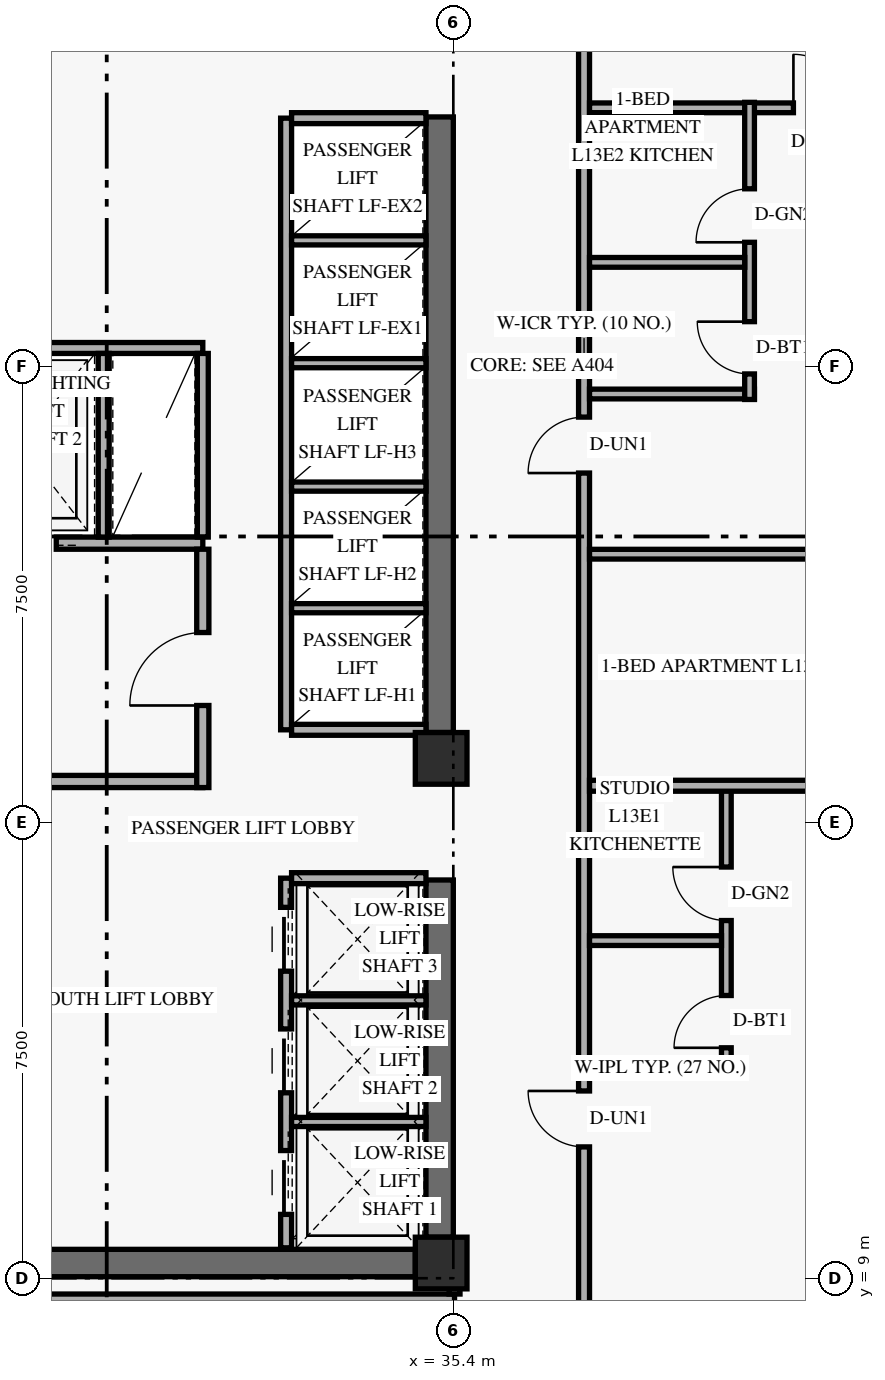
"""IFC4 building model, lengths in metres.
Left out: names, types, materials, properties, quantities, classifications, styles, units other than length and angle.
Written with IfcOpenShell. Run it as: python <this file> out.ifc"""

import sys

from ifc_helpers import new_model, si_unit, direction, frame, frame_2d, origin, origin_2d, place, context, subcontext, project, spatial, rectangle, extrude, element, fill, save


model = new_model("IFC4")
c1 = context("Model", 3, precision=1e-05, world=origin(), true_north=direction((0.0, 1.0)))
c2 = subcontext(c1, "Body", "Model", "MODEL_VIEW")
j1 = project(units=[si_unit("LENGTHUNIT", "METRE"), si_unit("PLANEANGLEUNIT", "RADIAN")], contexts=[c1])
p1 = place(None, origin())
s1 = spatial("IfcSite", under=j1, at=p1, CompositionType="ELEMENT")
p2 = place(p1, origin())
s2 = spatial("IfcBuilding", under=s1, at=p2, CompositionType="ELEMENT")
p3 = place(p2, frame((0.0, 0.0, 52.8)))
s3 = spatial("IfcBuildingStorey", under=s2, at=p3, CompositionType="ELEMENT", Elevation=52.8)
p4 = place(p3, frame((35.175, 9.675, 0.0), z_axis=(0.0, 0.0, 1.0), x_axis=(0.0, 1.0, 0.0)))
e1 = element("IfcWall", 1, at=p4, inside=s3, PredefinedType="SHEAR", context=c2, shape_type="SweptSolid", body=[
    extrude(rectangle(XDim=5.875, YDim=0.45, at=frame_2d((2.938, 0.0))), origin(), (0.0, 0.0, 1.0), 2.667),
])
p5 = place(p3, frame((35.175, 17.975, 0.0), z_axis=(0.0, 0.0, 1.0), x_axis=(0.0, 1.0, 0.0)))
e2 = element("IfcWall", 2, at=p5, inside=s3, PredefinedType="SHEAR", context=c2, shape_type="SweptSolid", body=[
    extrude(rectangle(XDim=10.125, YDim=0.45, at=frame_2d((5.062, 0.0))), origin(), (0.0, 0.0, 1.0), 2.667),
])
p6 = place(p3, frame((24.625, 9.25, 0.0), z_axis=(0.0, 0.0, 1.0), x_axis=(1.0, 0.0, 0.0)))
e3 = element("IfcWall", 3, at=p6, inside=s3, PredefinedType="SHEAR", context=c2, shape_type="SweptSolid", body=[
    extrude(rectangle(XDim=10.15, YDim=0.45, at=frame_2d((5.075, 0.0))), origin(), (0.0, 0.0, 1.0), 3.36),
])
for number, where, z_axis, x_axis in (
    (4, (35.2, 9.25, 0.0), (0.0, 0.0, 1.0), (1.0, 0.0, 0.0)),
    (5, (35.2, 17.55, 0.0), (0.0, 0.0, 1.0), (1.0, 0.0, 0.0)),
):
    element("IfcColumn", number, at=place(p3, frame(where, z_axis=z_axis, x_axis=x_axis)), inside=s3, PredefinedType="COLUMN", context=c2, shape_type="SweptSolid", body=[
        extrude(rectangle(XDim=0.85, YDim=0.85, at=origin_2d()), origin(), (0.0, 0.0, 1.0), 3.6),
    ])
p7 = place(p3, frame((24.45, 21.09, 0.0), z_axis=(0.0, 0.0, 1.0), x_axis=(1.0, 0.0, 0.0)))
e6 = element("IfcWall", 6, at=p7, inside=s3, PredefinedType="STANDARD", context=c2, shape_type="SweptSolid", body=[
    extrude(rectangle(XDim=6.83, YDim=0.2, at=frame_2d((3.415, 0.0))), origin(), (0.0, 0.0, 1.0), 3.36),
])
p8 = place(p7, frame((0.72, 0.0, 0.0)))
e7 = element("IfcOpeningElement", 7, at=p8, cuts=e6, PredefinedType="OPENING", context=c2, shape_type="SweptSolid", body=[
    extrude(rectangle(XDim=1.1, YDim=2.2, at=frame_2d((0.55, 1.1))), frame((0.0, 0.11, 0.0), z_axis=(0.0, -1.0, 0.0), x_axis=(1.0, 0.0, 0.0)), (0.0, 0.0, 1.0), 0.22),
])
p9 = place(p7, frame((3.32, 0.0, 0.0)))
e8 = element("IfcOpeningElement", 8, at=p9, cuts=e6, PredefinedType="OPENING", context=c2, shape_type="SweptSolid", body=[
    extrude(rectangle(XDim=1.1, YDim=2.2, at=frame_2d((0.55, 1.1))), frame((0.0, 0.11, 0.0), z_axis=(0.0, -1.0, 0.0), x_axis=(1.0, 0.0, 0.0)), (0.0, 0.0, 1.0), 0.22),
])
p10 = place(p3, frame((28.38, 17.17, 0.0), z_axis=(0.0, 0.0, 1.0), x_axis=(1.0, 0.0, 0.0)))
e9 = element("IfcWall", 9, at=p10, inside=s3, PredefinedType="STANDARD", context=c2, shape_type="SweptSolid", body=[
    extrude(rectangle(XDim=2.9, YDim=0.2, at=frame_2d((1.45, 0.0))), origin(), (0.0, 0.0, 1.0), 3.36),
])
p11 = place(p3, frame((31.28, 17.07, 0.0), z_axis=(0.0, 0.0, 1.0), x_axis=(0.0, 1.0, 0.0)))
e10 = element("IfcWall", 10, at=p11, inside=s3, PredefinedType="STANDARD", context=c2, shape_type="SweptSolid", body=[
    extrude(rectangle(XDim=3.92, YDim=0.2, at=frame_2d((1.96, 0.0))), origin(), (0.0, 0.0, 1.0), 2.649),
])
p12 = place(p11, frame((1.35, 0.0, 0.0)))
e11 = element("IfcOpeningElement", 11, at=p12, cuts=e10, PredefinedType="OPENING", context=c2, shape_type="SweptSolid", body=[
    extrude(rectangle(XDim=1.2, YDim=2.15, at=frame_2d((0.6, 1.075))), frame((0.0, 0.11, 0.0), z_axis=(0.0, -1.0, 0.0), x_axis=(1.0, 0.0, 0.0)), (0.0, 0.0, 1.0), 0.22),
])
p13 = place(p3, frame((24.45, 24.3, 0.0), z_axis=(0.0, 0.0, 1.0), x_axis=(1.0, 0.0, 0.0)))
e12 = element("IfcWall", 12, at=p13, inside=s3, PredefinedType="STANDARD", context=c2, shape_type="SweptSolid", body=[
    extrude(rectangle(XDim=6.83, YDim=0.18, at=frame_2d((3.415, 0.0))), origin(), (0.0, 0.0, 1.0), 3.36),
])
for number, where, z_axis, x_axis in (
    (13, (29.65, 21.19, 0.0), (0.0, 0.0, 1.0), (0.0, 1.0, 0.0)),
    (14, (31.28, 21.19, 0.0), (0.0, 0.0, 1.0), (0.0, 1.0, 0.0)),
):
    element("IfcWall", number, at=place(p3, frame(where, z_axis=z_axis, x_axis=x_axis)), inside=s3, PredefinedType="STANDARD", context=c2, shape_type="SweptSolid", body=[
        extrude(rectangle(XDim=3.02, YDim=0.18, at=frame_2d((1.51, 0.0))), origin(), (0.0, 0.0, 1.0), 3.36),
    ])
p14 = place(p3, frame((32.65, 9.5, 0.0), z_axis=(0.0, 0.0, 1.0), x_axis=(0.0, 1.0, 0.0)))
e15 = element("IfcWall", 15, at=p14, inside=s3, PredefinedType="STANDARD", context=c2, shape_type="SweptSolid", body=[
    extrude(rectangle(XDim=6.08, YDim=0.18, at=frame_2d((3.04, 0.0))), origin(), (0.0, 0.0, 1.0), 3.36),
])
p15 = place(p14, frame((0.55, 0.0, 0.0)))
e16 = element("IfcOpeningElement", 16, at=p15, cuts=e15, PredefinedType="OPENING", context=c2, shape_type="SweptSolid", body=[
    extrude(rectangle(XDim=1.05, YDim=2.2, at=frame_2d((0.525, 1.1))), frame((0.0, 0.1, 0.0), z_axis=(0.0, -1.0, 0.0), x_axis=(1.0, 0.0, 0.0)), (0.0, 0.0, 1.0), 0.2),
])
p16 = place(p14, frame((2.55, 0.0, 0.0)))
e17 = element("IfcOpeningElement", 17, at=p16, cuts=e15, PredefinedType="OPENING", context=c2, shape_type="SweptSolid", body=[
    extrude(rectangle(XDim=1.05, YDim=2.2, at=frame_2d((0.525, 1.1))), frame((0.0, 0.1, 0.0), z_axis=(0.0, -1.0, 0.0), x_axis=(1.0, 0.0, 0.0)), (0.0, 0.0, 1.0), 0.2),
])
p17 = place(p14, frame((4.55, 0.0, 0.0)))
e18 = element("IfcOpeningElement", 18, at=p17, cuts=e15, PredefinedType="OPENING", context=c2, shape_type="SweptSolid", body=[
    extrude(rectangle(XDim=1.05, YDim=2.2, at=frame_2d((0.525, 1.1))), frame((0.0, 0.1, 0.0), z_axis=(0.0, -1.0, 0.0), x_axis=(1.0, 0.0, 0.0)), (0.0, 0.0, 1.0), 0.2),
])
p18 = place(p3, frame((32.74, 15.58, 0.0), z_axis=(0.0, 0.0, 1.0), x_axis=(1.0, 0.0, 0.0)))
e19 = element("IfcWall", 19, at=p18, inside=s3, PredefinedType="STANDARD", context=c2, shape_type="SweptSolid", body=[
    extrude(rectangle(XDim=2.21, YDim=0.18, at=frame_2d((1.105, 0.0))), origin(), (0.0, 0.0, 1.0), 3.36),
])
for number, where, z_axis, x_axis in (
    (20, (32.74, 11.57, 0.0), (0.0, 0.0, 1.0), (1.0, 0.0, 0.0)),
    (21, (32.74, 13.57, 0.0), (0.0, 0.0, 1.0), (1.0, 0.0, 0.0)),
):
    element("IfcWall", number, at=place(p3, frame(where, z_axis=z_axis, x_axis=x_axis)), inside=s3, PredefinedType="STANDARD", context=c2, shape_type="SweptSolid", body=[
        extrude(rectangle(XDim=2.21, YDim=0.15, at=frame_2d((1.105, 0.0))), origin(), (0.0, 0.0, 1.0), 3.36),
    ])
p19 = place(p3, frame((32.65, 18.02, 0.0), z_axis=(0.0, 0.0, 1.0), x_axis=(0.0, 1.0, 0.0)))
e22 = element("IfcWall", 22, at=p19, inside=s3, PredefinedType="STANDARD", context=c2, shape_type="SweptSolid", body=[
    extrude(rectangle(XDim=10.06, YDim=0.18, at=frame_2d((5.03, 0.0))), origin(), (0.0, 0.0, 1.0), 3.36),
])
for number, where, z_axis, x_axis in (
    (23, (32.74, 18.02, 0.0), (0.0, 0.0, 1.0), (1.0, 0.0, 0.0)),
    (24, (32.74, 28.08, 0.0), (0.0, 0.0, 1.0), (1.0, 0.0, 0.0)),
):
    element("IfcWall", number, at=place(p3, frame(where, z_axis=z_axis, x_axis=x_axis)), inside=s3, PredefinedType="STANDARD", context=c2, shape_type="SweptSolid", body=[
        extrude(rectangle(XDim=2.21, YDim=0.18, at=frame_2d((1.105, 0.0))), origin(), (0.0, 0.0, 1.0), 3.36),
    ])
for number, where, z_axis, x_axis in (
    (25, (32.74, 20.02, 0.0), (0.0, 0.0, 1.0), (1.0, 0.0, 0.0)),
    (26, (32.74, 22.02, 0.0), (0.0, 0.0, 1.0), (1.0, 0.0, 0.0)),
    (27, (32.74, 24.05, 0.0), (0.0, 0.0, 1.0), (1.0, 0.0, 0.0)),
    (28, (32.74, 26.07, 0.0), (0.0, 0.0, 1.0), (1.0, 0.0, 0.0)),
):
    element("IfcWall", number, at=place(p3, frame(where, z_axis=z_axis, x_axis=x_axis)), inside=s3, PredefinedType="STANDARD", context=c2, shape_type="SweptSolid", body=[
        extrude(rectangle(XDim=2.21, YDim=0.15, at=frame_2d((1.105, 0.0))), origin(), (0.0, 0.0, 1.0), 3.36),
    ])
p20 = place(p3, frame((37.55, 1.29, 0.0), z_axis=(0.0, 0.0, 1.0), x_axis=(0.0, 1.0, 0.0)))
e29 = element("IfcWall", 29, at=p20, inside=s3, PredefinedType="STANDARD", context=c2, shape_type="SweptSolid", body=[
    extrude(rectangle(XDim=45.42, YDim=0.18, at=frame_2d((22.71, 0.0))), origin(), (0.0, 0.0, 1.0), 2.649),
])
p21 = place(p20, frame((9.87, 0.0, 0.0)))
e30 = element("IfcOpeningElement", 30, at=p21, cuts=e29, PredefinedType="OPENING", context=c2, shape_type="SweptSolid", body=[
    extrude(rectangle(XDim=0.92, YDim=2.15, at=frame_2d((0.46, 1.075))), frame((0.0, 0.1, 0.0), z_axis=(0.0, -1.0, 0.0), x_axis=(1.0, 0.0, 0.0)), (0.0, 0.0, 1.0), 0.2),
])
p22 = place(p20, frame((20.953, 0.0, 0.0)))
e31 = element("IfcOpeningElement", 31, at=p22, cuts=e29, PredefinedType="OPENING", context=c2, shape_type="SweptSolid", body=[
    extrude(rectangle(XDim=0.92, YDim=2.15, at=frame_2d((0.46, 1.075))), frame((0.0, 0.1, 0.0), z_axis=(0.0, -1.0, 0.0), x_axis=(1.0, 0.0, 0.0)), (0.0, 0.0, 1.0), 0.2),
])
p23 = place(p20, frame((35.534, 0.0, 0.0)))
e32 = element("IfcOpeningElement", 32, at=p23, cuts=e29, PredefinedType="OPENING", context=c2, shape_type="SweptSolid", body=[
    extrude(rectangle(XDim=0.92, YDim=2.15, at=frame_2d((0.46, 1.075))), frame((0.0, 0.1, 0.0), z_axis=(0.0, -1.0, 0.0), x_axis=(1.0, 0.0, 0.0)), (0.0, 0.0, 1.0), 0.2),
])
p24 = place(p3, frame((23.75, 8.65, 0.0), z_axis=(0.0, 0.0, 1.0), x_axis=(1.0, 0.0, 0.0)))
e33 = element("IfcWall", 33, at=p24, inside=s3, PredefinedType="STANDARD", context=c2, shape_type="SweptSolid", body=[
    extrude(rectangle(XDim=11.67, YDim=0.18, at=frame_2d((5.835, 0.0))), origin(), (0.0, 0.0, 1.0), 2.649),
])
p25 = place(p3, frame((35.42, 8.74, 0.0), z_axis=(0.0, 0.0, 1.0), x_axis=(0.0, 1.0, 0.0)))
e34 = element("IfcWall", 34, at=p25, inside=s3, PredefinedType="STANDARD", context=c2, shape_type="SweptSolid", body=[
    extrude(rectangle(XDim=0.51, YDim=0.18, at=frame_2d((0.255, 0.0))), origin(), (0.0, 0.0, 1.0), 3.36),
])
p26 = place(p3, frame((37.64, 12.46, 0.0), z_axis=(0.0, 0.0, 1.0), x_axis=(1.0, 0.0, 0.0)))
e35 = element("IfcWall", 35, at=p26, inside=s3, PredefinedType="PLUMBINGWALL", context=c2, shape_type="SweptSolid", body=[
    extrude(rectangle(XDim=2.33, YDim=0.16, at=frame_2d((1.165, 0.0))), origin(), (0.0, 0.0, 1.0), 3.36),
])
p27 = place(p3, frame((39.89, 12.37, 0.0), z_axis=(0.0, 0.0, 1.0), x_axis=(0.0, 1.0, 0.0)))
e36 = element("IfcWall", 36, at=p27, inside=s3, PredefinedType="PLUMBINGWALL", context=c2, shape_type="SweptSolid", body=[
    extrude(rectangle(XDim=4.73, YDim=0.16, at=frame_2d((2.365, 0.0))), origin(), (0.0, 0.0, 1.0), 2.932),
])
p28 = place(p27, frame((0.42, 0.0, 0.0)))
e37 = element("IfcOpeningElement", 37, at=p28, cuts=e36, PredefinedType="OPENING", context=c2, shape_type="SweptSolid", body=[
    extrude(rectangle(XDim=0.86, YDim=2.12, at=frame_2d((0.43, 1.06))), frame((0.0, 0.09, 0.0), z_axis=(0.0, -1.0, 0.0), x_axis=(1.0, 0.0, 0.0)), (0.0, 0.0, 1.0), 0.18),
])
p29 = place(p27, frame((2.513, 0.0, 0.0)))
e38 = element("IfcOpeningElement", 38, at=p29, cuts=e36, PredefinedType="OPENING", context=c2, shape_type="SweptSolid", body=[
    extrude(rectangle(XDim=0.88, YDim=2.12, at=frame_2d((0.44, 1.06))), frame((0.0, 0.09, 0.0), z_axis=(0.0, -1.0, 0.0), x_axis=(1.0, 0.0, 0.0)), (0.0, 0.0, 1.0), 0.18),
])
p30 = place(p3, frame((37.64, 14.553, 0.0), z_axis=(0.0, 0.0, 1.0), x_axis=(1.0, 0.0, 0.0)))
e39 = element("IfcWall", 39, at=p30, inside=s3, PredefinedType="PLUMBINGWALL", context=c2, shape_type="SweptSolid", body=[
    extrude(rectangle(XDim=2.17, YDim=0.16, at=frame_2d((1.085, 0.0))), origin(), (0.0, 0.0, 1.0), 3.36),
])
p31 = place(p3, frame((37.64, 17.1, 0.0), z_axis=(0.0, 0.0, 1.0), x_axis=(1.0, 0.0, 0.0)))
e40 = element("IfcWall", 40, at=p31, inside=s3, PredefinedType="PARTITIONING", context=c2, shape_type="SweptSolid", body=[
    extrude(rectangle(XDim=10.67, YDim=0.18, at=frame_2d((5.335, 0.0))), origin(), (0.0, 0.0, 1.0), 2.649),
])
p32 = place(p3, frame((37.64, 28.25, 0.0), z_axis=(0.0, 0.0, 1.0), x_axis=(1.0, 0.0, 0.0)))
e41 = element("IfcWall", 41, at=p32, inside=s3, PredefinedType="PARTITIONING", context=c2, shape_type="SweptSolid", body=[
    extrude(rectangle(XDim=10.67, YDim=0.16, at=frame_2d((5.335, 0.0))), origin(), (0.0, 0.0, 1.0), 2.649),
])
p33 = place(p32, frame((3.353, 0.0, 0.0)))
e42 = element("IfcOpeningElement", 42, at=p33, cuts=e41, PredefinedType="OPENING", context=c2, shape_type="SweptSolid", body=[
    extrude(rectangle(XDim=0.88, YDim=2.12, at=frame_2d((0.44, 1.06))), frame((0.0, 0.09, 0.0), z_axis=(0.0, -1.0, 0.0), x_axis=(1.0, 0.0, 0.0)), (0.0, 0.0, 1.0), 0.18),
])
p34 = place(p32, frame((7.432, 0.0, 0.0)))
e43 = element("IfcOpeningElement", 43, at=p34, cuts=e41, PredefinedType="OPENING", context=c2, shape_type="SweptSolid", body=[
    extrude(rectangle(XDim=0.9, YDim=2.14, at=frame_2d((0.45, 1.07))), frame((0.0, 0.09, 0.0), z_axis=(0.0, -1.0, 0.0), x_axis=(1.0, 0.0, 0.0)), (0.0, 0.0, 1.0), 0.18),
])
p35 = place(p3, frame((37.64, 23.543, 0.0), z_axis=(0.0, 0.0, 1.0), x_axis=(1.0, 0.0, 0.0)))
e44 = element("IfcWall", 44, at=p35, inside=s3, PredefinedType="PLUMBINGWALL", context=c2, shape_type="SweptSolid", body=[
    extrude(rectangle(XDim=2.712, YDim=0.16, at=frame_2d((1.356, 0.0))), origin(), (0.0, 0.0, 1.0), 3.36),
])
p36 = place(p3, frame((40.272, 23.453, 0.0), z_axis=(0.0, 0.0, 1.0), x_axis=(0.0, 1.0, 0.0)))
e45 = element("IfcWall", 45, at=p36, inside=s3, PredefinedType="PLUMBINGWALL", context=c2, shape_type="SweptSolid", body=[
    extrude(rectangle(XDim=4.887, YDim=0.16, at=frame_2d((2.444, 0.0))), origin(), (0.0, 0.0, 1.0), 3.36),
])
p37 = place(p36, frame((0.42, 0.0, 0.0)))
e46 = element("IfcOpeningElement", 46, at=p37, cuts=e45, PredefinedType="OPENING", context=c2, shape_type="SweptSolid", body=[
    extrude(rectangle(XDim=0.86, YDim=2.12, at=frame_2d((0.43, 1.06))), frame((0.0, 0.09, 0.0), z_axis=(0.0, -1.0, 0.0), x_axis=(1.0, 0.0, 0.0)), (0.0, 0.0, 1.0), 0.18),
])
p38 = place(p36, frame((2.585, 0.0, 0.0)))
e47 = element("IfcOpeningElement", 47, at=p38, cuts=e45, PredefinedType="OPENING", context=c2, shape_type="SweptSolid", body=[
    extrude(rectangle(XDim=0.88, YDim=2.12, at=frame_2d((0.44, 1.06))), frame((0.0, 0.09, 0.0), z_axis=(0.0, -1.0, 0.0), x_axis=(1.0, 0.0, 0.0)), (0.0, 0.0, 1.0), 0.18),
])
p39 = place(p3, frame((37.64, 25.708, 0.0), z_axis=(0.0, 0.0, 1.0), x_axis=(1.0, 0.0, 0.0)))
e48 = element("IfcWall", 48, at=p39, inside=s3, PredefinedType="PLUMBINGWALL", context=c2, shape_type="SweptSolid", body=[
    extrude(rectangle(XDim=2.552, YDim=0.16, at=frame_2d((1.276, 0.0))), origin(), (0.0, 0.0, 1.0), 3.36),
])
p40 = place(p3, frame((37.64, 20.908, 0.0), z_axis=(0.0, 0.0, 1.0), x_axis=(1.0, 0.0, 0.0)))
e49 = element("IfcWall", 49, at=p40, inside=s3, PredefinedType="PARTITIONING", context=c2, shape_type="SweptSolid", body=[
    extrude(rectangle(XDim=10.67, YDim=0.16, at=frame_2d((5.335, 0.0))), origin(), (0.0, 0.0, 1.0), 2.649),
])
p41 = place(p40, frame((5.315, 0.0, 0.0)))
e50 = element("IfcOpeningElement", 50, at=p41, cuts=e49, PredefinedType="OPENING", context=c2, shape_type="SweptSolid", body=[
    extrude(rectangle(XDim=0.95, YDim=2.15, at=frame_2d((0.475, 1.075))), frame((0.0, 0.09, 0.0), z_axis=(0.0, -1.0, 0.0), x_axis=(1.0, 0.0, 0.0)), (0.0, 0.0, 1.0), 0.18),
])
p42 = place(p9, origin())
e51 = element("IfcDoor", 51, at=p42, inside=s3, OperationType="SLIDING_TO_LEFT", PredefinedType="DOOR", context=c2, shape_type="SweptSolid", body=[
    extrude(rectangle(XDim=1.1, YDim=2.2, at=frame_2d((0.55, 1.1))), frame((0.0, 0.025, 0.0), z_axis=(0.0, -1.0, 0.0), x_axis=(1.0, 0.0, 0.0)), (0.0, 0.0, 1.0), 0.05),
])
fill(e8, e51)
p43 = place(p12, origin())
e52 = element("IfcDoor", 52, at=p43, inside=s3, OperationType="SINGLE_SWING_LEFT", PredefinedType="DOOR", context=c2, shape_type="SweptSolid", body=[
    extrude(rectangle(XDim=1.2, YDim=2.15, at=frame_2d((0.6, 1.075))), frame((0.0, 0.025, 0.0), z_axis=(0.0, -1.0, 0.0), x_axis=(1.0, 0.0, 0.0)), (0.0, 0.0, 1.0), 0.05),
])
fill(e11, e52)
p44 = place(p15, origin())
e53 = element("IfcDoor", 53, at=p44, inside=s3, OperationType="SLIDING_TO_LEFT", PredefinedType="DOOR", context=c2, shape_type="SweptSolid", body=[
    extrude(rectangle(XDim=1.05, YDim=2.2, at=frame_2d((0.525, 1.1))), frame((0.0, 0.025, 0.0), z_axis=(0.0, -1.0, 0.0), x_axis=(1.0, 0.0, 0.0)), (0.0, 0.0, 1.0), 0.05),
])
fill(e16, e53)
p45 = place(p16, origin())
e54 = element("IfcDoor", 54, at=p45, inside=s3, OperationType="SLIDING_TO_LEFT", PredefinedType="DOOR", context=c2, shape_type="SweptSolid", body=[
    extrude(rectangle(XDim=1.05, YDim=2.2, at=frame_2d((0.525, 1.1))), frame((0.0, 0.025, 0.0), z_axis=(0.0, -1.0, 0.0), x_axis=(1.0, 0.0, 0.0)), (0.0, 0.0, 1.0), 0.05),
])
fill(e17, e54)
p46 = place(p17, origin())
e55 = element("IfcDoor", 55, at=p46, inside=s3, OperationType="SLIDING_TO_LEFT", PredefinedType="DOOR", context=c2, shape_type="SweptSolid", body=[
    extrude(rectangle(XDim=1.05, YDim=2.2, at=frame_2d((0.525, 1.1))), frame((0.0, 0.025, 0.0), z_axis=(0.0, -1.0, 0.0), x_axis=(1.0, 0.0, 0.0)), (0.0, 0.0, 1.0), 0.05),
])
fill(e18, e55)
p47 = place(p21, origin())
e56 = element("IfcDoor", 56, at=p47, inside=s3, OperationType="SINGLE_SWING_RIGHT", PredefinedType="DOOR", context=c2, shape_type="SweptSolid", body=[
    extrude(rectangle(XDim=0.92, YDim=2.15, at=frame_2d((0.46, 1.075))), frame((0.0, 0.025, 0.0), z_axis=(0.0, -1.0, 0.0), x_axis=(1.0, 0.0, 0.0)), (0.0, 0.0, 1.0), 0.05),
])
fill(e30, e56)
p48 = place(p28, origin())
e57 = element("IfcDoor", 57, at=p48, inside=s3, OperationType="SINGLE_SWING_LEFT", PredefinedType="DOOR", context=c2, shape_type="SweptSolid", body=[
    extrude(rectangle(XDim=0.86, YDim=2.12, at=frame_2d((0.43, 1.06))), frame((0.0, 0.025, 0.0), z_axis=(0.0, -1.0, 0.0), x_axis=(1.0, 0.0, 0.0)), (0.0, 0.0, 1.0), 0.05),
])
fill(e37, e57)
p49 = place(p29, origin())
e58 = element("IfcDoor", 58, at=p49, inside=s3, OperationType="SINGLE_SWING_RIGHT", PredefinedType="DOOR", context=c2, shape_type="SweptSolid", body=[
    extrude(rectangle(XDim=0.88, YDim=2.12, at=frame_2d((0.44, 1.06))), frame((0.0, 0.025, 0.0), z_axis=(0.0, -1.0, 0.0), x_axis=(1.0, 0.0, 0.0)), (0.0, 0.0, 1.0), 0.05),
])
fill(e38, e58)
p50 = place(p22, origin())
e59 = element("IfcDoor", 59, at=p50, inside=s3, OperationType="SINGLE_SWING_LEFT", PredefinedType="DOOR", context=c2, shape_type="SweptSolid", body=[
    extrude(rectangle(XDim=0.92, YDim=2.15, at=frame_2d((0.46, 1.075))), frame((0.0, 0.025, 0.0), z_axis=(0.0, -1.0, 0.0), x_axis=(1.0, 0.0, 0.0)), (0.0, 0.0, 1.0), 0.05),
])
fill(e31, e59)
p51 = place(p37, origin())
e60 = element("IfcDoor", 60, at=p51, inside=s3, OperationType="SINGLE_SWING_RIGHT", PredefinedType="DOOR", context=c2, shape_type="SweptSolid", body=[
    extrude(rectangle(XDim=0.86, YDim=2.12, at=frame_2d((0.43, 1.06))), frame((0.0, 0.025, 0.0), z_axis=(0.0, -1.0, 0.0), x_axis=(1.0, 0.0, 0.0)), (0.0, 0.0, 1.0), 0.05),
])
fill(e46, e60)
p52 = place(p38, origin())
e61 = element("IfcDoor", 61, at=p52, inside=s3, OperationType="SINGLE_SWING_LEFT", PredefinedType="DOOR", context=c2, shape_type="SweptSolid", body=[
    extrude(rectangle(XDim=0.88, YDim=2.12, at=frame_2d((0.44, 1.06))), frame((0.0, 0.025, 0.0), z_axis=(0.0, -1.0, 0.0), x_axis=(1.0, 0.0, 0.0)), (0.0, 0.0, 1.0), 0.05),
])
fill(e47, e61)
p53 = place(p33, origin())
e62 = element("IfcDoor", 62, at=p53, inside=s3, OperationType="SINGLE_SWING_LEFT", PredefinedType="DOOR", context=c2, shape_type="SweptSolid", body=[
    extrude(rectangle(XDim=0.88, YDim=2.12, at=frame_2d((0.44, 1.06))), frame((0.0, 0.025, 0.0), z_axis=(0.0, -1.0, 0.0), x_axis=(1.0, 0.0, 0.0)), (0.0, 0.0, 1.0), 0.05),
])
fill(e42, e62)
save(model, sys.argv[1])
